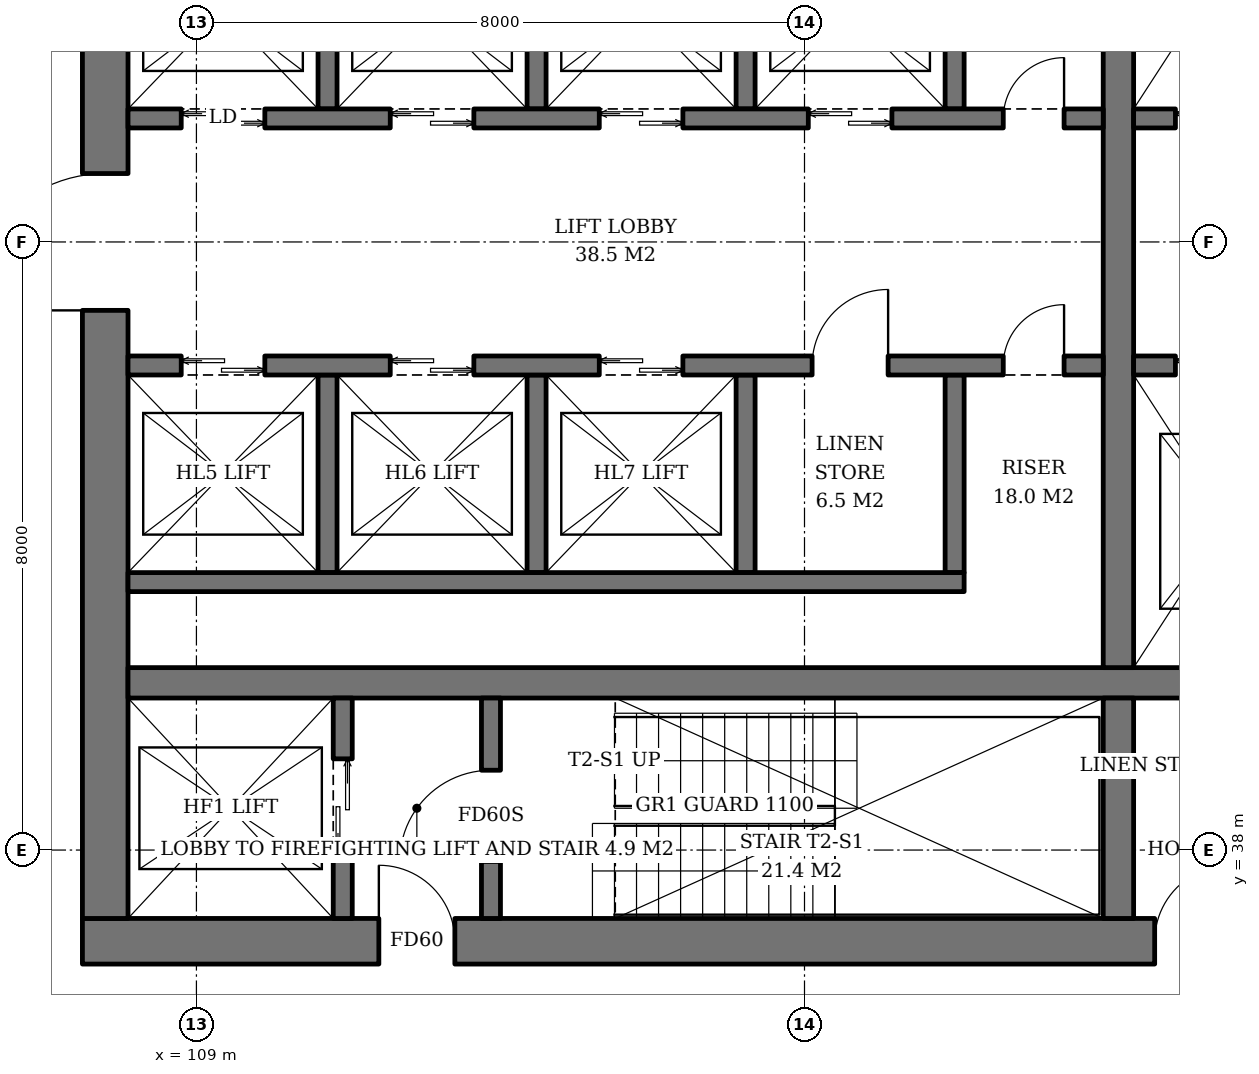
"""IFC4 building model, lengths in metres.
Left out: names, types, materials, properties, quantities, classifications, styles, units other than length and angle.
Written with IfcOpenShell. Run it as: python <this file> out.ifc"""

import sys

from ifc_helpers import new_model, si_unit, direction, frame, frame_2d, origin, place, context, subcontext, project, spatial, rectangle, extrude, element, fill, save


model = new_model("IFC4")
c1 = context("Model", 3, precision=1e-05, world=origin(), true_north=direction((0.0, 1.0)))
c2 = subcontext(c1, "Body", "Model", "MODEL_VIEW")
j1 = project(units=[si_unit("LENGTHUNIT", "METRE"), si_unit("PLANEANGLEUNIT", "RADIAN")], contexts=[c1])
p1 = place(None, origin())
s1 = spatial("IfcSite", under=j1, at=p1, CompositionType="ELEMENT")
p2 = place(p1, origin())
s2 = spatial("IfcBuilding", under=s1, at=p2, CompositionType="ELEMENT")
p3 = place(p2, frame((0.0, 0.0, 70.4)))
s3 = spatial("IfcBuildingStorey", under=s2, at=p3, CompositionType="ELEMENT", Elevation=70.4)
p4 = place(p3, frame((107.5, 36.8, 0.0), z_axis=(0.0, 0.0, 1.0), x_axis=(1.0, 0.0, 0.0)))
e1 = element("IfcWall", 1, at=p4, inside=s3, PredefinedType="SHEAR", context=c2, shape_type="SweptSolid", body=[
    extrude(rectangle(XDim=19.0, YDim=0.6, at=frame_2d((9.5, 0.0))), origin(), (0.0, 0.0, 1.0), 3.8),
])
p5 = place(p4, frame((3.9, 0.0, 0.0)))
e2 = element("IfcOpeningElement", 2, at=p5, cuts=e1, PredefinedType="OPENING", context=c2, shape_type="SweptSolid", body=[
    extrude(rectangle(XDim=1.0, YDim=2.1, at=frame_2d((0.5, 1.05))), frame((0.0, 0.31, 0.0), z_axis=(0.0, -1.0, 0.0), x_axis=(1.0, 0.0, 0.0)), (0.0, 0.0, 1.0), 0.62),
])
p6 = place(p4, frame((14.107, 0.0, 0.0)))
e3 = element("IfcOpeningElement", 3, at=p6, cuts=e1, PredefinedType="OPENING", context=c2, shape_type="SweptSolid", body=[
    extrude(rectangle(XDim=1.0, YDim=2.1, at=frame_2d((0.5, 1.05))), frame((0.0, 0.31, 0.0), z_axis=(0.0, -1.0, 0.0), x_axis=(1.0, 0.0, 0.0)), (0.0, 0.0, 1.0), 0.62),
])
p7 = place(p4, frame((15.638, 0.0, 0.0)))
e4 = element("IfcOpeningElement", 4, at=p7, cuts=e1, PredefinedType="OPENING", context=c2, shape_type="SweptSolid", body=[
    extrude(rectangle(XDim=1.0, YDim=2.1, at=frame_2d((0.5, 1.05))), frame((0.0, 0.31, 0.0), z_axis=(0.0, -1.0, 0.0), x_axis=(1.0, 0.0, 0.0)), (0.0, 0.0, 1.0), 0.62),
])
p8 = place(p4, frame((17.142, 0.0, 0.0)))
e5 = element("IfcOpeningElement", 5, at=p8, cuts=e1, PredefinedType="OPENING", context=c2, shape_type="SweptSolid", body=[
    extrude(rectangle(XDim=1.0, YDim=2.1, at=frame_2d((0.5, 1.05))), frame((0.0, 0.31, 0.0), z_axis=(0.0, -1.0, 0.0), x_axis=(1.0, 0.0, 0.0)), (0.0, 0.0, 1.0), 0.62),
])
p9 = place(p3, frame((107.8, 37.1, 0.0), z_axis=(0.0, 0.0, 1.0), x_axis=(0.0, 1.0, 0.0)))
e6 = element("IfcWall", 6, at=p9, inside=s3, PredefinedType="SHEAR", context=c2, shape_type="SweptSolid", body=[
    extrude(rectangle(XDim=17.8, YDim=0.6, at=frame_2d((8.9, 0.0))), origin(), (0.0, 0.0, 1.0), 3.8),
])
p10 = place(p9, frame((8.0, 0.0, 0.0)))
e7 = element("IfcOpeningElement", 7, at=p10, cuts=e6, PredefinedType="OPENING", context=c2, shape_type="SweptSolid", body=[
    extrude(rectangle(XDim=1.8, YDim=2.4, at=frame_2d((0.9, 1.2))), frame((0.0, 0.31, 0.0), z_axis=(0.0, -1.0, 0.0), x_axis=(1.0, 0.0, 0.0)), (0.0, 0.0, 1.0), 0.62),
])
p11 = place(p3, frame((108.1, 40.2, 0.0), z_axis=(0.0, 0.0, 1.0), x_axis=(1.0, 0.0, 0.0)))
e8 = element("IfcWall", 8, at=p11, inside=s3, PredefinedType="SHEAR", context=c2, shape_type="SweptSolid", body=[
    extrude(rectangle(XDim=17.8, YDim=0.4, at=frame_2d((8.9, 0.0))), origin(), (0.0, 0.0, 1.0), 3.8),
])
p12 = place(p3, frame((121.13, 37.1, 0.0), z_axis=(0.0, 0.0, 1.0), x_axis=(0.0, 1.0, 0.0)))
e9 = element("IfcWall", 9, at=p12, inside=s3, PredefinedType="SHEAR", context=c2, shape_type="SweptSolid", body=[
    extrude(rectangle(XDim=2.9, YDim=0.4, at=frame_2d((1.45, 0.0))), origin(), (0.0, 0.0, 1.0), 3.8),
])
p13 = place(p3, frame((121.13, 40.4, 0.0), z_axis=(0.0, 0.0, 1.0), x_axis=(0.0, 1.0, 0.0)))
e10 = element("IfcWall", 10, at=p13, inside=s3, PredefinedType="SHEAR", context=c2, shape_type="SweptSolid", body=[
    extrude(rectangle(XDim=11.2, YDim=0.4, at=frame_2d((5.6, 0.0))), origin(), (0.0, 0.0, 1.0), 3.8),
])
p14 = place(p3, frame((110.925, 37.1, 0.0), z_axis=(0.0, 0.0, 1.0), x_axis=(0.0, 1.0, 0.0)))
e11 = element("IfcWall", 11, at=p14, inside=s3, PredefinedType="SHEAR", context=c2, shape_type="SweptSolid", body=[
    extrude(rectangle(XDim=2.9, YDim=0.25, at=frame_2d((1.45, 0.0))), origin(), (0.0, 0.0, 1.0), 3.8),
])
p15 = place(p14, frame((0.8, 0.0, 0.0)))
e12 = element("IfcOpeningElement", 12, at=p15, cuts=e11, PredefinedType="OPENING", context=c2, shape_type="SweptSolid", body=[
    extrude(rectangle(XDim=1.3, YDim=2.2, at=frame_2d((0.65, 1.1))), frame((0.0, 0.135, 0.0), z_axis=(0.0, -1.0, 0.0), x_axis=(1.0, 0.0, 0.0)), (0.0, 0.0, 1.0), 0.27),
])
p16 = place(p3, frame((112.875, 37.1, 0.0), z_axis=(0.0, 0.0, 1.0), x_axis=(0.0, 1.0, 0.0)))
e13 = element("IfcWall", 13, at=p16, inside=s3, PredefinedType="SHEAR", context=c2, shape_type="SweptSolid", body=[
    extrude(rectangle(XDim=2.9, YDim=0.25, at=frame_2d((1.45, 0.0))), origin(), (0.0, 0.0, 1.0), 3.8),
])
p17 = place(p16, frame((0.75, 0.0, 0.0)))
e14 = element("IfcOpeningElement", 14, at=p17, cuts=e13, PredefinedType="OPENING", context=c2, shape_type="SweptSolid", body=[
    extrude(rectangle(XDim=1.2, YDim=2.1, at=frame_2d((0.6, 1.05))), frame((0.0, 0.135, 0.0), z_axis=(0.0, -1.0, 0.0), x_axis=(1.0, 0.0, 0.0)), (0.0, 0.0, 1.0), 0.27),
])
for number, where, z_axis, x_axis in (
    (15, (110.725, 47.75, 0.0), (0.0, 0.0, 1.0), (0.0, 1.0, 0.0)),
    (16, (113.475, 47.75, 0.0), (0.0, 0.0, 1.0), (0.0, 1.0, 0.0)),
    (17, (116.225, 47.75, 0.0), (0.0, 0.0, 1.0), (0.0, 1.0, 0.0)),
    (18, (118.975, 47.75, 0.0), (0.0, 0.0, 1.0), (0.0, 1.0, 0.0)),
):
    element("IfcWall", number, at=place(p3, frame(where, z_axis=z_axis, x_axis=x_axis)), inside=s3, PredefinedType="SHEAR", context=c2, shape_type="SweptSolid", body=[
        extrude(rectangle(XDim=2.6, YDim=0.25, at=frame_2d((1.3, 0.0))), origin(), (0.0, 0.0, 1.0), 3.8),
    ])
p18 = place(p3, frame((108.1, 47.625, 0.0), z_axis=(0.0, 0.0, 1.0), x_axis=(1.0, 0.0, 0.0)))
e19 = element("IfcWall", 19, at=p18, inside=s3, PredefinedType="SHEAR", context=c2, shape_type="SweptSolid", body=[
    extrude(rectangle(XDim=12.83, YDim=0.25, at=frame_2d((6.415, 0.0))), origin(), (0.0, 0.0, 1.0), 3.8),
])
p19 = place(p18, frame((0.7, 0.0, 0.0)))
e20 = element("IfcOpeningElement", 20, at=p19, cuts=e19, PredefinedType="OPENING", context=c2, shape_type="SweptSolid", body=[
    extrude(rectangle(XDim=1.1, YDim=2.2, at=frame_2d((0.55, 1.1))), frame((0.0, 0.135, 0.0), z_axis=(0.0, -1.0, 0.0), x_axis=(1.0, 0.0, 0.0)), (0.0, 0.0, 1.0), 0.27),
])
p20 = place(p18, frame((3.45, 0.0, 0.0)))
e21 = element("IfcOpeningElement", 21, at=p20, cuts=e19, PredefinedType="OPENING", context=c2, shape_type="SweptSolid", body=[
    extrude(rectangle(XDim=1.1, YDim=2.2, at=frame_2d((0.55, 1.1))), frame((0.0, 0.135, 0.0), z_axis=(0.0, -1.0, 0.0), x_axis=(1.0, 0.0, 0.0)), (0.0, 0.0, 1.0), 0.27),
])
p21 = place(p18, frame((6.2, 0.0, 0.0)))
e22 = element("IfcOpeningElement", 22, at=p21, cuts=e19, PredefinedType="OPENING", context=c2, shape_type="SweptSolid", body=[
    extrude(rectangle(XDim=1.1, YDim=2.2, at=frame_2d((0.55, 1.1))), frame((0.0, 0.135, 0.0), z_axis=(0.0, -1.0, 0.0), x_axis=(1.0, 0.0, 0.0)), (0.0, 0.0, 1.0), 0.27),
])
p22 = place(p18, frame((8.95, 0.0, 0.0)))
e23 = element("IfcOpeningElement", 23, at=p22, cuts=e19, PredefinedType="OPENING", context=c2, shape_type="SweptSolid", body=[
    extrude(rectangle(XDim=1.1, YDim=2.2, at=frame_2d((0.55, 1.1))), frame((0.0, 0.135, 0.0), z_axis=(0.0, -1.0, 0.0), x_axis=(1.0, 0.0, 0.0)), (0.0, 0.0, 1.0), 0.27),
])
p23 = place(p18, frame((11.515, 0.0, 0.0)))
e24 = element("IfcOpeningElement", 24, at=p23, cuts=e19, PredefinedType="OPENING", context=c2, shape_type="SweptSolid", body=[
    extrude(rectangle(XDim=0.8, YDim=2.0, at=frame_2d((0.4, 1.0))), frame((0.0, 0.135, 0.0), z_axis=(0.0, -1.0, 0.0), x_axis=(1.0, 0.0, 0.0)), (0.0, 0.0, 1.0), 0.27),
])
for number, where, z_axis, x_axis in (
    (25, (110.725, 44.25, 0.0), (0.0, 0.0, 1.0), (0.0, -1.0, 0.0)),
    (26, (113.475, 44.25, 0.0), (0.0, 0.0, 1.0), (0.0, -1.0, 0.0)),
    (27, (116.225, 44.25, 0.0), (0.0, 0.0, 1.0), (0.0, -1.0, 0.0)),
    (28, (118.975, 44.25, 0.0), (0.0, 0.0, 1.0), (0.0, -1.0, 0.0)),
):
    element("IfcWall", number, at=place(p3, frame(where, z_axis=z_axis, x_axis=x_axis)), inside=s3, PredefinedType="SHEAR", context=c2, shape_type="SweptSolid", body=[
        extrude(rectangle(XDim=2.6, YDim=0.25, at=frame_2d((1.3, 0.0))), origin(), (0.0, 0.0, 1.0), 3.8),
    ])
p24 = place(p3, frame((108.1, 41.525, 0.0), z_axis=(0.0, 0.0, 1.0), x_axis=(1.0, 0.0, 0.0)))
e29 = element("IfcWall", 29, at=p24, inside=s3, PredefinedType="SHEAR", context=c2, shape_type="SweptSolid", body=[
    extrude(rectangle(XDim=11.0, YDim=0.25, at=frame_2d((5.5, 0.0))), origin(), (0.0, 0.0, 1.0), 3.8),
])
p25 = place(p3, frame((108.1, 44.375, 0.0), z_axis=(0.0, 0.0, 1.0), x_axis=(1.0, 0.0, 0.0)))
e30 = element("IfcWall", 30, at=p25, inside=s3, PredefinedType="SHEAR", context=c2, shape_type="SweptSolid", body=[
    extrude(rectangle(XDim=12.83, YDim=0.25, at=frame_2d((6.415, 0.0))), origin(), (0.0, 0.0, 1.0), 3.8),
])
p26 = place(p25, frame((0.7, 0.0, 0.0)))
e31 = element("IfcOpeningElement", 31, at=p26, cuts=e30, PredefinedType="OPENING", context=c2, shape_type="SweptSolid", body=[
    extrude(rectangle(XDim=1.1, YDim=2.2, at=frame_2d((0.55, 1.1))), frame((0.0, 0.135, 0.0), z_axis=(0.0, -1.0, 0.0), x_axis=(1.0, 0.0, 0.0)), (0.0, 0.0, 1.0), 0.27),
])
p27 = place(p25, frame((3.45, 0.0, 0.0)))
e32 = element("IfcOpeningElement", 32, at=p27, cuts=e30, PredefinedType="OPENING", context=c2, shape_type="SweptSolid", body=[
    extrude(rectangle(XDim=1.1, YDim=2.2, at=frame_2d((0.55, 1.1))), frame((0.0, 0.135, 0.0), z_axis=(0.0, -1.0, 0.0), x_axis=(1.0, 0.0, 0.0)), (0.0, 0.0, 1.0), 0.27),
])
p28 = place(p25, frame((6.2, 0.0, 0.0)))
e33 = element("IfcOpeningElement", 33, at=p28, cuts=e30, PredefinedType="OPENING", context=c2, shape_type="SweptSolid", body=[
    extrude(rectangle(XDim=1.1, YDim=2.2, at=frame_2d((0.55, 1.1))), frame((0.0, 0.135, 0.0), z_axis=(0.0, -1.0, 0.0), x_axis=(1.0, 0.0, 0.0)), (0.0, 0.0, 1.0), 0.27),
])
p29 = place(p25, frame((9.0, 0.0, 0.0)))
e34 = element("IfcOpeningElement", 34, at=p29, cuts=e30, PredefinedType="OPENING", context=c2, shape_type="SweptSolid", body=[
    extrude(rectangle(XDim=1.0, YDim=2.1, at=frame_2d((0.5, 1.05))), frame((0.0, 0.135, 0.0), z_axis=(0.0, -1.0, 0.0), x_axis=(1.0, 0.0, 0.0)), (0.0, 0.0, 1.0), 0.27),
])
p30 = place(p25, frame((11.515, 0.0, 0.0)))
e35 = element("IfcOpeningElement", 35, at=p30, cuts=e30, PredefinedType="OPENING", context=c2, shape_type="SweptSolid", body=[
    extrude(rectangle(XDim=0.8, YDim=2.0, at=frame_2d((0.4, 1.0))), frame((0.0, 0.135, 0.0), z_axis=(0.0, -1.0, 0.0), x_axis=(1.0, 0.0, 0.0)), (0.0, 0.0, 1.0), 0.27),
])
p31 = place(p3, frame((121.33, 47.625, 0.0), z_axis=(0.0, 0.0, 1.0), x_axis=(1.0, 0.0, 0.0)))
e36 = element("IfcWall", 36, at=p31, inside=s3, PredefinedType="SHEAR", context=c2, shape_type="SweptSolid", body=[
    extrude(rectangle(XDim=4.57, YDim=0.25, at=frame_2d((2.285, 0.0))), origin(), (0.0, 0.0, 1.0), 3.8),
])
p32 = place(p31, frame((0.55, 0.0, 0.0)))
e37 = element("IfcOpeningElement", 37, at=p32, cuts=e36, PredefinedType="OPENING", context=c2, shape_type="SweptSolid", body=[
    extrude(rectangle(XDim=1.4, YDim=2.4, at=frame_2d((0.7, 1.2))), frame((0.0, 0.135, 0.0), z_axis=(0.0, -1.0, 0.0), x_axis=(1.0, 0.0, 0.0)), (0.0, 0.0, 1.0), 0.27),
])
p33 = place(p31, frame((3.26, 0.0, 0.0)))
e38 = element("IfcOpeningElement", 38, at=p33, cuts=e36, PredefinedType="OPENING", context=c2, shape_type="SweptSolid", body=[
    extrude(rectangle(XDim=0.8, YDim=2.0, at=frame_2d((0.4, 1.0))), frame((0.0, 0.135, 0.0), z_axis=(0.0, -1.0, 0.0), x_axis=(1.0, 0.0, 0.0)), (0.0, 0.0, 1.0), 0.27),
])
p34 = place(p3, frame((121.33, 44.375, 0.0), z_axis=(0.0, 0.0, 1.0), x_axis=(1.0, 0.0, 0.0)))
e39 = element("IfcWall", 39, at=p34, inside=s3, PredefinedType="SHEAR", context=c2, shape_type="SweptSolid", body=[
    extrude(rectangle(XDim=4.57, YDim=0.25, at=frame_2d((2.285, 0.0))), origin(), (0.0, 0.0, 1.0), 3.8),
])
p35 = place(p34, frame((0.55, 0.0, 0.0)))
e40 = element("IfcOpeningElement", 40, at=p35, cuts=e39, PredefinedType="OPENING", context=c2, shape_type="SweptSolid", body=[
    extrude(rectangle(XDim=1.4, YDim=2.4, at=frame_2d((0.7, 1.2))), frame((0.0, 0.135, 0.0), z_axis=(0.0, -1.0, 0.0), x_axis=(1.0, 0.0, 0.0)), (0.0, 0.0, 1.0), 0.27),
])
p36 = place(p34, frame((3.26, 0.0, 0.0)))
e41 = element("IfcOpeningElement", 41, at=p36, cuts=e39, PredefinedType="OPENING", context=c2, shape_type="SweptSolid", body=[
    extrude(rectangle(XDim=0.8, YDim=2.0, at=frame_2d((0.4, 1.0))), frame((0.0, 0.135, 0.0), z_axis=(0.0, -1.0, 0.0), x_axis=(1.0, 0.0, 0.0)), (0.0, 0.0, 1.0), 0.27),
])
p37 = place(p15, origin())
e42 = element("IfcDoor", 42, at=p37, inside=s3, OperationType="DOUBLE_DOOR_SLIDING", PredefinedType="DOOR", context=c2, shape_type="SweptSolid", body=[
    extrude(rectangle(XDim=1.3, YDim=2.2, at=frame_2d((0.65, 1.1))), frame((0.0, 0.025, 0.0), z_axis=(0.0, -1.0, 0.0), x_axis=(1.0, 0.0, 0.0)), (0.0, 0.0, 1.0), 0.05),
])
fill(e12, e42)
p38 = place(p17, origin())
e43 = element("IfcDoor", 43, at=p38, inside=s3, OperationType="SINGLE_SWING_LEFT", PredefinedType="DOOR", context=c2, shape_type="SweptSolid", body=[
    extrude(rectangle(XDim=1.2, YDim=2.1, at=frame_2d((0.6, 1.05))), frame((0.0, 0.025, 0.0), z_axis=(0.0, -1.0, 0.0), x_axis=(1.0, 0.0, 0.0)), (0.0, 0.0, 1.0), 0.05),
])
fill(e14, e43)
p39 = place(p19, origin())
e44 = element("IfcDoor", 44, at=p39, inside=s3, OperationType="DOUBLE_DOOR_SLIDING", PredefinedType="DOOR", context=c2, shape_type="SweptSolid", body=[
    extrude(rectangle(XDim=1.1, YDim=2.2, at=frame_2d((0.55, 1.1))), frame((0.0, 0.025, 0.0), z_axis=(0.0, -1.0, 0.0), x_axis=(1.0, 0.0, 0.0)), (0.0, 0.0, 1.0), 0.05),
])
fill(e20, e44)
p40 = place(p20, origin())
e45 = element("IfcDoor", 45, at=p40, inside=s3, OperationType="DOUBLE_DOOR_SLIDING", PredefinedType="DOOR", context=c2, shape_type="SweptSolid", body=[
    extrude(rectangle(XDim=1.1, YDim=2.2, at=frame_2d((0.55, 1.1))), frame((0.0, 0.025, 0.0), z_axis=(0.0, -1.0, 0.0), x_axis=(1.0, 0.0, 0.0)), (0.0, 0.0, 1.0), 0.05),
])
fill(e21, e45)
p41 = place(p21, origin())
e46 = element("IfcDoor", 46, at=p41, inside=s3, OperationType="DOUBLE_DOOR_SLIDING", PredefinedType="DOOR", context=c2, shape_type="SweptSolid", body=[
    extrude(rectangle(XDim=1.1, YDim=2.2, at=frame_2d((0.55, 1.1))), frame((0.0, 0.025, 0.0), z_axis=(0.0, -1.0, 0.0), x_axis=(1.0, 0.0, 0.0)), (0.0, 0.0, 1.0), 0.05),
])
fill(e22, e46)
p42 = place(p22, origin())
e47 = element("IfcDoor", 47, at=p42, inside=s3, OperationType="DOUBLE_DOOR_SLIDING", PredefinedType="DOOR", context=c2, shape_type="SweptSolid", body=[
    extrude(rectangle(XDim=1.1, YDim=2.2, at=frame_2d((0.55, 1.1))), frame((0.0, 0.025, 0.0), z_axis=(0.0, -1.0, 0.0), x_axis=(1.0, 0.0, 0.0)), (0.0, 0.0, 1.0), 0.05),
])
fill(e23, e47)
p43 = place(p23, origin())
e48 = element("IfcDoor", 48, at=p43, inside=s3, OperationType="SINGLE_SWING_RIGHT", PredefinedType="DOOR", context=c2, shape_type="SweptSolid", body=[
    extrude(rectangle(XDim=0.8, YDim=2.0, at=frame_2d((0.4, 1.0))), frame((0.0, 0.025, 0.0), z_axis=(0.0, -1.0, 0.0), x_axis=(1.0, 0.0, 0.0)), (0.0, 0.0, 1.0), 0.05),
])
fill(e24, e48)
p44 = place(p26, origin())
e49 = element("IfcDoor", 49, at=p44, inside=s3, OperationType="DOUBLE_DOOR_SLIDING", PredefinedType="DOOR", context=c2, shape_type="SweptSolid", body=[
    extrude(rectangle(XDim=1.1, YDim=2.2, at=frame_2d((0.55, 1.1))), frame((0.0, 0.025, 0.0), z_axis=(0.0, -1.0, 0.0), x_axis=(1.0, 0.0, 0.0)), (0.0, 0.0, 1.0), 0.05),
])
fill(e31, e49)
p45 = place(p27, origin())
e50 = element("IfcDoor", 50, at=p45, inside=s3, OperationType="DOUBLE_DOOR_SLIDING", PredefinedType="DOOR", context=c2, shape_type="SweptSolid", body=[
    extrude(rectangle(XDim=1.1, YDim=2.2, at=frame_2d((0.55, 1.1))), frame((0.0, 0.025, 0.0), z_axis=(0.0, -1.0, 0.0), x_axis=(1.0, 0.0, 0.0)), (0.0, 0.0, 1.0), 0.05),
])
fill(e32, e50)
p46 = place(p28, origin())
e51 = element("IfcDoor", 51, at=p46, inside=s3, OperationType="DOUBLE_DOOR_SLIDING", PredefinedType="DOOR", context=c2, shape_type="SweptSolid", body=[
    extrude(rectangle(XDim=1.1, YDim=2.2, at=frame_2d((0.55, 1.1))), frame((0.0, 0.025, 0.0), z_axis=(0.0, -1.0, 0.0), x_axis=(1.0, 0.0, 0.0)), (0.0, 0.0, 1.0), 0.05),
])
fill(e33, e51)
p47 = place(p29, origin())
e52 = element("IfcDoor", 52, at=p47, inside=s3, OperationType="SINGLE_SWING_RIGHT", PredefinedType="DOOR", context=c2, shape_type="SweptSolid", body=[
    extrude(rectangle(XDim=1.0, YDim=2.1, at=frame_2d((0.5, 1.05))), frame((0.0, 0.025, 0.0), z_axis=(0.0, -1.0, 0.0), x_axis=(1.0, 0.0, 0.0)), (0.0, 0.0, 1.0), 0.05),
])
fill(e34, e52)
p48 = place(p30, origin())
e53 = element("IfcDoor", 53, at=p48, inside=s3, OperationType="SINGLE_SWING_RIGHT", PredefinedType="DOOR", context=c2, shape_type="SweptSolid", body=[
    extrude(rectangle(XDim=0.8, YDim=2.0, at=frame_2d((0.4, 1.0))), frame((0.0, 0.025, 0.0), z_axis=(0.0, -1.0, 0.0), x_axis=(1.0, 0.0, 0.0)), (0.0, 0.0, 1.0), 0.05),
])
fill(e35, e53)
p49 = place(p32, origin())
e54 = element("IfcDoor", 54, at=p49, inside=s3, OperationType="DOUBLE_DOOR_SLIDING", PredefinedType="DOOR", context=c2, shape_type="SweptSolid", body=[
    extrude(rectangle(XDim=1.4, YDim=2.4, at=frame_2d((0.7, 1.2))), frame((0.0, 0.025, 0.0), z_axis=(0.0, -1.0, 0.0), x_axis=(1.0, 0.0, 0.0)), (0.0, 0.0, 1.0), 0.05),
])
fill(e37, e54)
p50 = place(p35, origin())
e55 = element("IfcDoor", 55, at=p50, inside=s3, OperationType="DOUBLE_DOOR_SLIDING", PredefinedType="DOOR", context=c2, shape_type="SweptSolid", body=[
    extrude(rectangle(XDim=1.4, YDim=2.4, at=frame_2d((0.7, 1.2))), frame((0.0, 0.025, 0.0), z_axis=(0.0, -1.0, 0.0), x_axis=(1.0, 0.0, 0.0)), (0.0, 0.0, 1.0), 0.05),
])
fill(e40, e55)
p51 = place(p5, origin())
e56 = element("IfcDoor", 56, at=p51, inside=s3, OperationType="SINGLE_SWING_LEFT", PredefinedType="DOOR", context=c2, shape_type="SweptSolid", body=[
    extrude(rectangle(XDim=1.0, YDim=2.1, at=frame_2d((0.5, 1.05))), frame((0.0, 0.025, 0.0), z_axis=(0.0, -1.0, 0.0), x_axis=(1.0, 0.0, 0.0)), (0.0, 0.0, 1.0), 0.05),
])
fill(e2, e56)
p52 = place(p10, origin())
e57 = element("IfcDoor", 57, at=p52, inside=s3, OperationType="DOUBLE_DOOR_SINGLE_SWING", PredefinedType="DOOR", context=c2, shape_type="SweptSolid", body=[
    extrude(rectangle(XDim=1.8, YDim=2.4, at=frame_2d((0.9, 1.2))), frame((0.0, 0.025, 0.0), z_axis=(0.0, -1.0, 0.0), x_axis=(1.0, 0.0, 0.0)), (0.0, 0.0, 1.0), 0.05),
])
fill(e7, e57)
p53 = place(p6, origin())
e58 = element("IfcDoor", 58, at=p53, inside=s3, OperationType="SINGLE_SWING_RIGHT", PredefinedType="DOOR", context=c2, shape_type="SweptSolid", body=[
    extrude(rectangle(XDim=1.0, YDim=2.1, at=frame_2d((0.5, 1.05))), frame((0.0, 0.29, 0.0), z_axis=(0.0, -1.0, 0.0), x_axis=(1.0, 0.0, 0.0)), (0.0, 0.0, 1.0), 0.05),
])
fill(e3, e58)
save(model, sys.argv[1])
